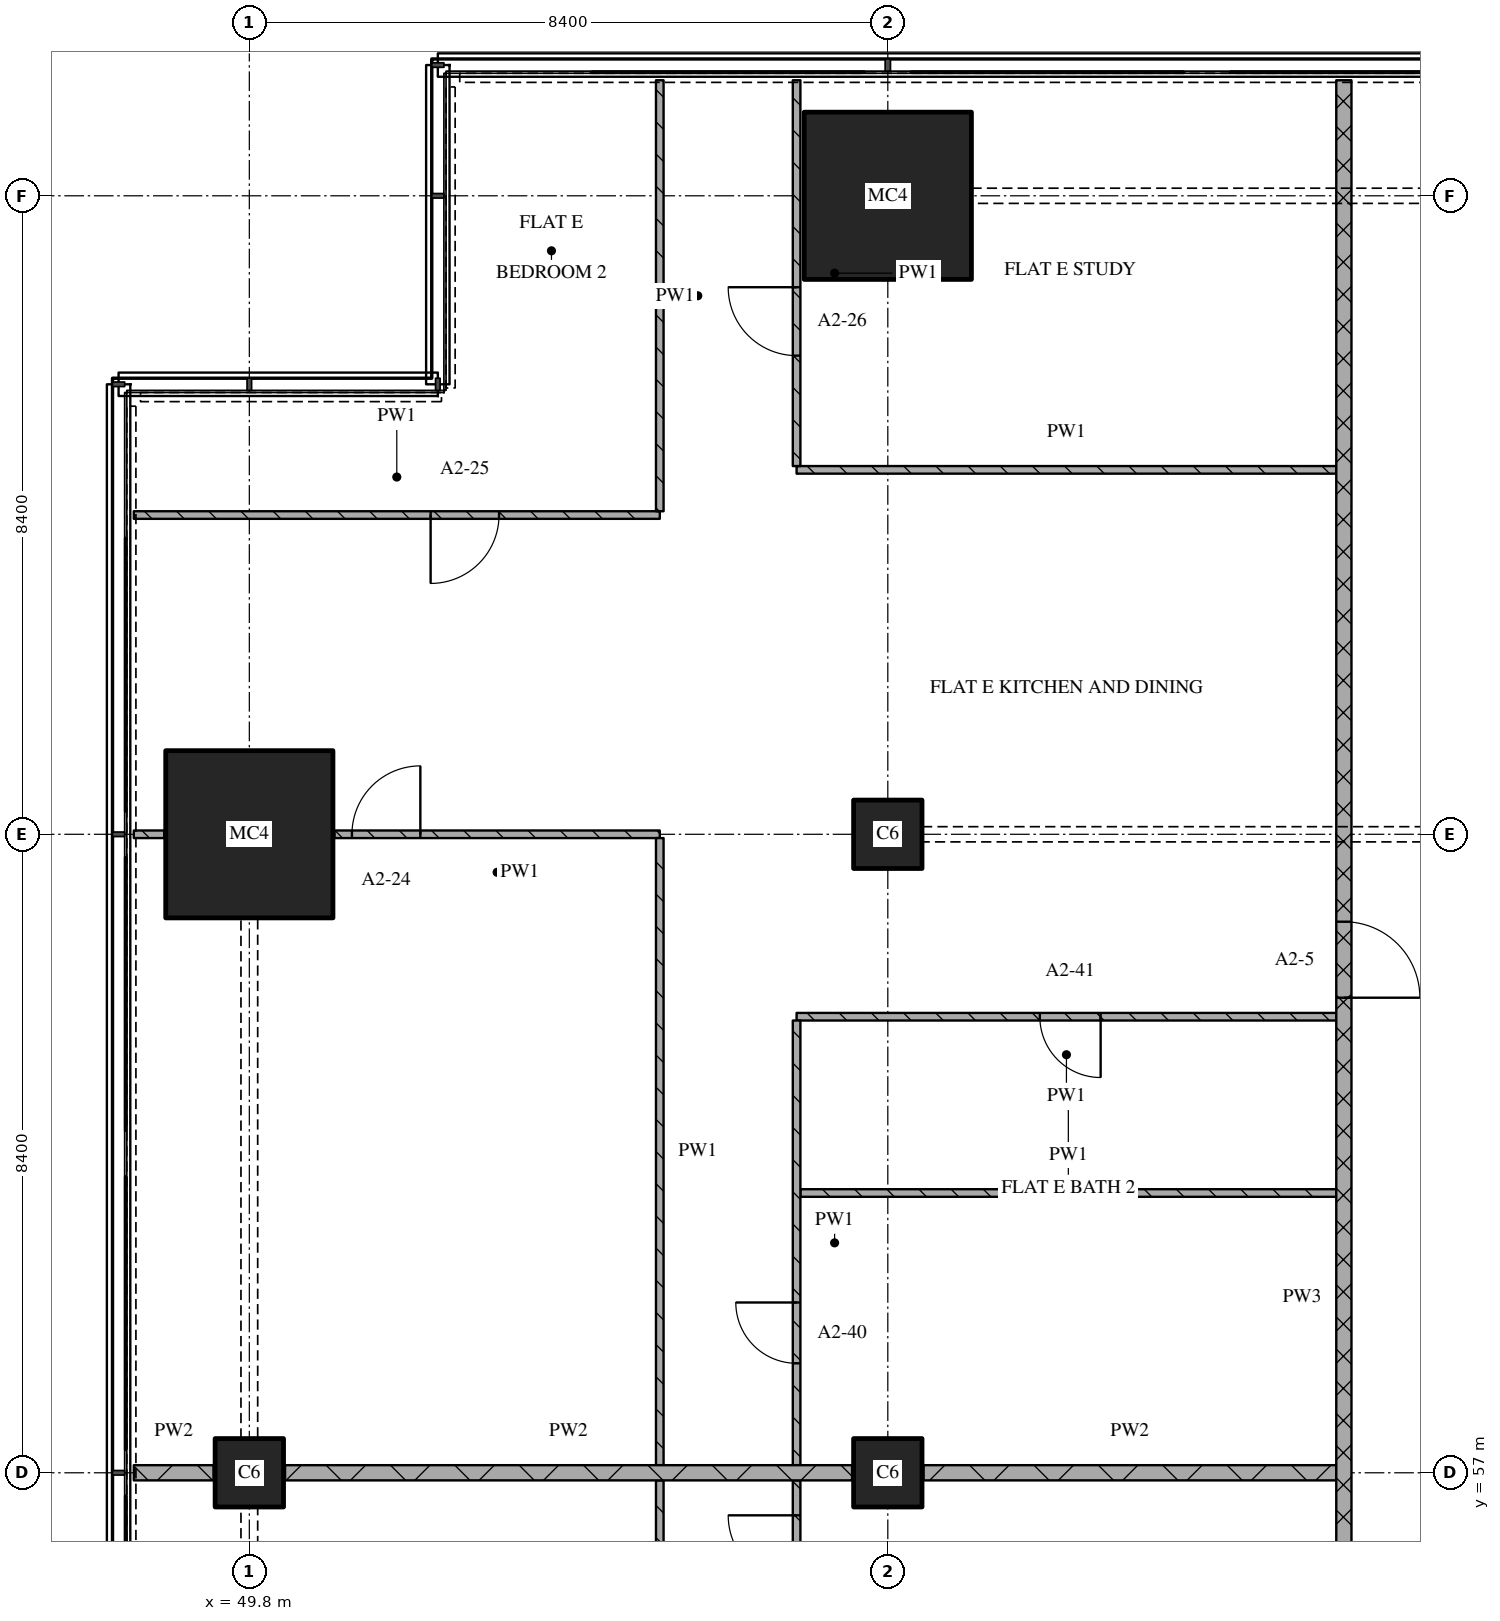
"""IFC4 building model, lengths in metres.
Left out: names, types, materials, properties, quantities, classifications, styles, units other than length and angle.
Written with IfcOpenShell. Run it as: python <this file> out.ifc"""

import sys

from ifc_helpers import new_model, si_unit, direction, frame, frame_2d, origin, origin_2d, place, context, subcontext, project, spatial, rectangle, extrude, element, fill, save


model = new_model("IFC4")
c1 = context("Model", 3, precision=1e-05, world=origin(), true_north=direction((0.0, 1.0)))
c2 = subcontext(c1, "Body", "Model", "MODEL_VIEW")
j1 = project(units=[si_unit("LENGTHUNIT", "METRE"), si_unit("PLANEANGLEUNIT", "RADIAN")], contexts=[c1])
p1 = place(None, origin())
s1 = spatial("IfcSite", under=j1, at=p1, CompositionType="ELEMENT")
p2 = place(p1, origin())
s2 = spatial("IfcBuilding", under=s1, at=p2, CompositionType="ELEMENT")
p3 = place(p2, frame((0.0, 0.0, 51.6)))
s3 = spatial("IfcBuildingStorey", under=s2, at=p3, CompositionType="ELEMENT", Elevation=51.6)
p4 = place(p3, frame((49.8, 57.0, 0.0), z_axis=(0.0, 0.0, 1.0), x_axis=(1.0, 0.0, 0.0)))
e1 = element("IfcColumn", 1, at=p4, inside=s3, PredefinedType="COLUMN", context=c2, shape_type="SweptSolid", body=[
    extrude(rectangle(XDim=0.9, YDim=0.9, at=origin_2d()), origin(), (0.0, 0.0, 1.0), 3.6),
])
p5 = place(p3, frame((49.8, 65.4, 0.0), z_axis=(0.0, 0.0, 1.0), x_axis=(1.0, 0.0, 0.0)))
e2 = element("IfcColumn", 2, at=p5, inside=s3, PredefinedType="COLUMN", context=c2, shape_type="SweptSolid", body=[
    extrude(rectangle(XDim=2.2, YDim=2.2, at=origin_2d()), origin(), (0.0, 0.0, 1.0), 3.6),
])
for number, where, z_axis, x_axis in (
    (3, (58.2, 57.0, 0.0), (0.0, 0.0, 1.0), (1.0, 0.0, 0.0)),
    (4, (58.2, 65.4, 0.0), (0.0, 0.0, 1.0), (1.0, 0.0, 0.0)),
):
    element("IfcColumn", number, at=place(p3, frame(where, z_axis=z_axis, x_axis=x_axis)), inside=s3, PredefinedType="COLUMN", context=c2, shape_type="SweptSolid", body=[
        extrude(rectangle(XDim=0.9, YDim=0.9, at=origin_2d()), origin(), (0.0, 0.0, 1.0), 3.6),
    ])
p6 = place(p3, frame((58.2, 73.8, 0.0), z_axis=(0.0, 0.0, 1.0), x_axis=(1.0, 0.0, 0.0)))
e5 = element("IfcColumn", 5, at=p6, inside=s3, PredefinedType="COLUMN", context=c2, shape_type="SweptSolid", body=[
    extrude(rectangle(XDim=2.2, YDim=2.2, at=origin_2d()), origin(), (0.0, 0.0, 1.0), 3.6),
])
p7 = place(p3, frame((48.28, 57.0, 0.0), z_axis=(0.0, 0.0, 1.0), x_axis=(1.0, 0.0, 0.0)))
e6 = element("IfcWall", 6, at=p7, inside=s3, PredefinedType="PARTITIONING", context=c2, shape_type="SweptSolid", body=[
    extrude(rectangle(XDim=1.05, YDim=0.2, at=frame_2d((0.525, 0.0))), origin(), (0.0, 0.0, 1.0), 3.32),
])
p8 = place(p3, frame((50.27, 57.0, 0.0), z_axis=(0.0, 0.0, 1.0), x_axis=(1.0, 0.0, 0.0)))
e7 = element("IfcWall", 7, at=p8, inside=s3, PredefinedType="PARTITIONING", context=c2, shape_type="SweptSolid", body=[
    extrude(rectangle(XDim=7.46, YDim=0.2, at=frame_2d((3.73, 0.0))), origin(), (0.0, 0.0, 1.0), 3.32),
])
p9 = place(p3, frame((58.67, 57.0, 0.0), z_axis=(0.0, 0.0, 1.0), x_axis=(1.0, 0.0, 0.0)))
e8 = element("IfcWall", 8, at=p9, inside=s3, PredefinedType="PARTITIONING", context=c2, shape_type="SweptSolid", body=[
    extrude(rectangle(XDim=5.43, YDim=0.2, at=frame_2d((2.715, 0.0))), origin(), (0.0, 0.0, 1.0), 3.32),
])
p10 = place(p3, frame((57.05, 60.681, 0.0), z_axis=(0.0, 0.0, 1.0), x_axis=(1.0, 0.0, 0.0)))
e9 = element("IfcWall", 9, at=p10, inside=s3, PredefinedType="PARTITIONING", context=c2, shape_type="SweptSolid", body=[
    extrude(rectangle(XDim=7.05, YDim=0.1, at=frame_2d((3.525, 0.0))), origin(), (0.0, 0.0, 1.0), 3.32),
])
p11 = place(p3, frame((64.1, 63.0, 0.0), z_axis=(0.0, 0.0, 1.0), x_axis=(-1.0, 0.0, 0.0)))
e10 = element("IfcWall", 10, at=p11, inside=s3, PredefinedType="PARTITIONING", context=c2, shape_type="SweptSolid", body=[
    extrude(rectangle(XDim=7.1, YDim=0.1, at=frame_2d((3.55, 0.0))), origin(), (0.0, 0.0, 1.0), 3.32),
])
p12 = place(p11, frame((3.1, 0.0, 0.0)))
e11 = element("IfcOpeningElement", 11, at=p12, cuts=e10, PredefinedType="OPENING", context=c2, shape_type="SweptSolid", body=[
    extrude(rectangle(XDim=0.8, YDim=2.1, at=frame_2d((0.4, 1.05))), frame((0.0, 0.06, 0.0), z_axis=(0.0, -1.0, 0.0), x_axis=(1.0, 0.0, 0.0)), (0.0, 0.0, 1.0), 0.12),
])
p13 = place(p3, frame((48.28, 65.4, 0.0), z_axis=(0.0, 0.0, 1.0), x_axis=(1.0, 0.0, 0.0)))
e12 = element("IfcWall", 12, at=p13, inside=s3, PredefinedType="PARTITIONING", context=c2, shape_type="SweptSolid", body=[
    extrude(rectangle(XDim=0.4, YDim=0.1, at=frame_2d((0.2, 0.0))), origin(), (0.0, 0.0, 1.0), 3.32),
])
p14 = place(p3, frame((55.2, 65.4, 0.0), z_axis=(0.0, 0.0, 1.0), x_axis=(-1.0, 0.0, 0.0)))
e13 = element("IfcWall", 13, at=p14, inside=s3, PredefinedType="PARTITIONING", context=c2, shape_type="SweptSolid", body=[
    extrude(rectangle(XDim=4.28, YDim=0.1, at=frame_2d((2.14, 0.0))), origin(), (0.0, 0.0, 1.0), 3.32),
])
p15 = place(p14, frame((3.15, 0.0, 0.0)))
e14 = element("IfcOpeningElement", 14, at=p15, cuts=e13, PredefinedType="OPENING", context=c2, shape_type="SweptSolid", body=[
    extrude(rectangle(XDim=0.9, YDim=2.1, at=frame_2d((0.45, 1.05))), frame((0.0, 0.06, 0.0), z_axis=(0.0, -1.0, 0.0), x_axis=(1.0, 0.0, 0.0)), (0.0, 0.0, 1.0), 0.12),
])
p16 = place(p3, frame((48.28, 69.6, 0.0), z_axis=(0.0, 0.0, 1.0), x_axis=(1.0, 0.0, 0.0)))
e15 = element("IfcWall", 15, at=p16, inside=s3, PredefinedType="PARTITIONING", context=c2, shape_type="SweptSolid", body=[
    extrude(rectangle(XDim=6.92, YDim=0.1, at=frame_2d((3.46, 0.0))), origin(), (0.0, 0.0, 1.0), 3.32),
])
p17 = place(p16, frame((3.905, 0.0, 0.0)))
e16 = element("IfcOpeningElement", 16, at=p17, cuts=e15, PredefinedType="OPENING", context=c2, shape_type="SweptSolid", body=[
    extrude(rectangle(XDim=0.9, YDim=2.1, at=frame_2d((0.45, 1.05))), frame((0.0, 0.06, 0.0), z_axis=(0.0, -1.0, 0.0), x_axis=(1.0, 0.0, 0.0)), (0.0, 0.0, 1.0), 0.12),
])
p18 = place(p3, frame((57.0, 70.194, 0.0), z_axis=(0.0, 0.0, 1.0), x_axis=(1.0, 0.0, 0.0)))
e17 = element("IfcWall", 17, at=p18, inside=s3, PredefinedType="PARTITIONING", context=c2, shape_type="SweptSolid", body=[
    extrude(rectangle(XDim=7.1, YDim=0.1, at=frame_2d((3.55, 0.0))), origin(), (0.0, 0.0, 1.0), 3.32),
])
p19 = place(p3, frame((55.2, 75.32, 0.0), z_axis=(0.0, 0.0, 1.0), x_axis=(0.0, -1.0, 0.0)))
e18 = element("IfcWall", 18, at=p19, inside=s3, PredefinedType="PARTITIONING", context=c2, shape_type="SweptSolid", body=[
    extrude(rectangle(XDim=5.67, YDim=0.1, at=frame_2d((2.835, 0.0))), origin(), (0.0, 0.0, 1.0), 3.32),
])
p20 = place(p3, frame((57.0, 75.32, 0.0), z_axis=(0.0, 0.0, 1.0), x_axis=(0.0, -1.0, 0.0)))
e19 = element("IfcWall", 19, at=p20, inside=s3, PredefinedType="PARTITIONING", context=c2, shape_type="SweptSolid", body=[
    extrude(rectangle(XDim=5.076, YDim=0.1, at=frame_2d((2.538, 0.0))), origin(), (0.0, 0.0, 1.0), 3.32),
])
p21 = place(p20, frame((2.723, 0.0, 0.0)))
e20 = element("IfcOpeningElement", 20, at=p21, cuts=e19, PredefinedType="OPENING", context=c2, shape_type="SweptSolid", body=[
    extrude(rectangle(XDim=0.9, YDim=2.1, at=frame_2d((0.45, 1.05))), frame((0.0, 0.06, 0.0), z_axis=(0.0, -1.0, 0.0), x_axis=(1.0, 0.0, 0.0)), (0.0, 0.0, 1.0), 0.12),
])
p22 = place(p3, frame((64.2, 43.3, 0.0), z_axis=(0.0, 0.0, 1.0), x_axis=(0.0, 1.0, 0.0)))
e21 = element("IfcWall", 21, at=p22, inside=s3, PredefinedType="PARTITIONING", context=c2, shape_type="SweptSolid", body=[
    extrude(rectangle(XDim=32.02, YDim=0.2, at=frame_2d((16.01, 0.0))), origin(), (0.0, 0.0, 1.0), 3.32),
])
p23 = place(p22, frame((19.95, 0.0, 0.0)))
e22 = element("IfcOpeningElement", 22, at=p23, cuts=e21, PredefinedType="OPENING", context=c2, shape_type="SweptSolid", body=[
    extrude(rectangle(XDim=1.0, YDim=2.1, at=frame_2d((0.5, 1.05))), frame((0.0, 0.11, 0.0), z_axis=(0.0, -1.0, 0.0), x_axis=(1.0, 0.0, 0.0)), (0.0, 0.0, 1.0), 0.22),
])
for number, where, z_axis, x_axis in (
    (23, (55.2, 56.9, 0.0), (0.0, 0.0, 1.0), (0.0, -1.0, 0.0)),
    (24, (55.2, 65.35, 0.0), (0.0, 0.0, 1.0), (0.0, -1.0, 0.0)),
):
    element("IfcWall", number, at=place(p3, frame(where, z_axis=z_axis, x_axis=x_axis)), inside=s3, PredefinedType="PARTITIONING", context=c2, shape_type="SweptSolid", body=[
        extrude(rectangle(XDim=8.25, YDim=0.1, at=frame_2d((4.125, 0.0))), origin(), (0.0, 0.0, 1.0), 3.32),
    ])
p24 = place(p3, frame((57.0, 56.9, 0.0), z_axis=(0.0, 0.0, 1.0), x_axis=(0.0, -1.0, 0.0)))
e25 = element("IfcWall", 25, at=p24, inside=s3, PredefinedType="PARTITIONING", context=c2, shape_type="SweptSolid", body=[
    extrude(rectangle(XDim=5.25, YDim=0.1, at=frame_2d((2.625, 0.0))), origin(), (0.0, 0.0, 1.0), 3.32),
])
p25 = place(p24, frame((0.46, 0.0, 0.0)))
e26 = element("IfcOpeningElement", 26, at=p25, cuts=e25, PredefinedType="OPENING", context=c2, shape_type="SweptSolid", body=[
    extrude(rectangle(XDim=0.9, YDim=2.1, at=frame_2d((0.45, 1.05))), frame((0.0, 0.06, 0.0), z_axis=(0.0, -1.0, 0.0), x_axis=(1.0, 0.0, 0.0)), (0.0, 0.0, 1.0), 0.12),
])
p26 = place(p3, frame((57.0, 62.95, 0.0), z_axis=(0.0, 0.0, 1.0), x_axis=(0.0, -1.0, 0.0)))
e27 = element("IfcWall", 27, at=p26, inside=s3, PredefinedType="PARTITIONING", context=c2, shape_type="SweptSolid", body=[
    extrude(rectangle(XDim=5.85, YDim=0.1, at=frame_2d((2.925, 0.0))), origin(), (0.0, 0.0, 1.0), 3.32),
])
p27 = place(p26, frame((3.71, 0.0, 0.0)))
e28 = element("IfcOpeningElement", 28, at=p27, cuts=e27, PredefinedType="OPENING", context=c2, shape_type="SweptSolid", body=[
    extrude(rectangle(XDim=0.8, YDim=2.1, at=frame_2d((0.4, 1.05))), frame((0.0, 0.06, 0.0), z_axis=(0.0, -1.0, 0.0), x_axis=(1.0, 0.0, 0.0)), (0.0, 0.0, 1.0), 0.12),
])
p28 = place(p12, origin())
e29 = element("IfcDoor", 29, at=p28, inside=s3, OperationType="SINGLE_SWING_LEFT", PredefinedType="DOOR", context=c2, shape_type="SweptSolid", body=[
    extrude(rectangle(XDim=0.8, YDim=2.1, at=frame_2d((0.4, 1.05))), frame((0.0, 0.025, 0.0), z_axis=(0.0, -1.0, 0.0), x_axis=(1.0, 0.0, 0.0)), (0.0, 0.0, 1.0), 0.05),
])
fill(e11, e29)
p29 = place(p15, origin())
e30 = element("IfcDoor", 30, at=p29, inside=s3, OperationType="SINGLE_SWING_RIGHT", PredefinedType="DOOR", context=c2, shape_type="SweptSolid", body=[
    extrude(rectangle(XDim=0.9, YDim=2.1, at=frame_2d((0.45, 1.05))), frame((0.0, 0.025, 0.0), z_axis=(0.0, -1.0, 0.0), x_axis=(1.0, 0.0, 0.0)), (0.0, 0.0, 1.0), 0.05),
])
fill(e14, e30)
p30 = place(p17, origin())
e31 = element("IfcDoor", 31, at=p30, inside=s3, OperationType="SINGLE_SWING_RIGHT", PredefinedType="DOOR", context=c2, shape_type="SweptSolid", body=[
    extrude(rectangle(XDim=0.9, YDim=2.1, at=frame_2d((0.45, 1.05))), frame((0.0, 0.025, 0.0), z_axis=(0.0, -1.0, 0.0), x_axis=(1.0, 0.0, 0.0)), (0.0, 0.0, 1.0), 0.05),
])
fill(e16, e31)
p31 = place(p21, origin())
e32 = element("IfcDoor", 32, at=p31, inside=s3, OperationType="SINGLE_SWING_RIGHT", PredefinedType="DOOR", context=c2, shape_type="SweptSolid", body=[
    extrude(rectangle(XDim=0.9, YDim=2.1, at=frame_2d((0.45, 1.05))), frame((0.0, 0.025, 0.0), z_axis=(0.0, -1.0, 0.0), x_axis=(1.0, 0.0, 0.0)), (0.0, 0.0, 1.0), 0.05),
])
fill(e20, e32)
p32 = place(p23, origin())
e33 = element("IfcDoor", 33, at=p32, inside=s3, OperationType="SINGLE_SWING_RIGHT", PredefinedType="DOOR", context=c2, shape_type="SweptSolid", body=[
    extrude(rectangle(XDim=1.0, YDim=2.1, at=frame_2d((0.5, 1.05))), frame((0.0, 0.025, 0.0), z_axis=(0.0, -1.0, 0.0), x_axis=(1.0, 0.0, 0.0)), (0.0, 0.0, 1.0), 0.05),
])
fill(e22, e33)
p33 = place(p25, origin())
e34 = element("IfcDoor", 34, at=p33, inside=s3, OperationType="SINGLE_SWING_RIGHT", PredefinedType="DOOR", context=c2, shape_type="SweptSolid", body=[
    extrude(rectangle(XDim=0.9, YDim=2.1, at=frame_2d((0.45, 1.05))), frame((0.0, 0.025, 0.0), z_axis=(0.0, -1.0, 0.0), x_axis=(1.0, 0.0, 0.0)), (0.0, 0.0, 1.0), 0.05),
])
fill(e26, e34)
p34 = place(p27, origin())
e35 = element("IfcDoor", 35, at=p34, inside=s3, OperationType="SINGLE_SWING_RIGHT", PredefinedType="DOOR", context=c2, shape_type="SweptSolid", body=[
    extrude(rectangle(XDim=0.8, YDim=2.1, at=frame_2d((0.4, 1.05))), frame((0.0, 0.025, 0.0), z_axis=(0.0, -1.0, 0.0), x_axis=(1.0, 0.0, 0.0)), (0.0, 0.0, 1.0), 0.05),
])
fill(e28, e35)
save(model, sys.argv[1])
